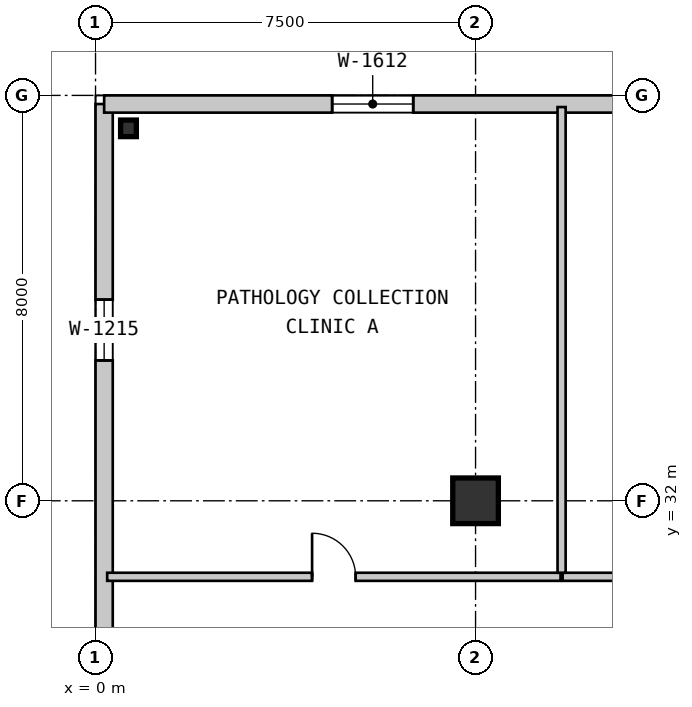
"""IFC4 building model, lengths in metres.
Left out: names, types, materials, properties, quantities, classifications, styles, units other than length and angle.
Written with IfcOpenShell. Run it as: python <this file> out.ifc"""

import sys

from ifc_helpers import new_model, si_unit, direction, frame, frame_2d, origin, origin_2d, place, context, subcontext, project, spatial, rectangle, circle, i_section, extrude, source, transform, mapped, element, fill, save


model = new_model("IFC4")
c1 = context("Model", 3, precision=1e-05, world=origin(), true_north=direction((0.0, 1.0)))
c2 = subcontext(c1, "Body", "Model", "MODEL_VIEW")
j1 = project(units=[si_unit("LENGTHUNIT", "METRE"), si_unit("PLANEANGLEUNIT", "RADIAN")], contexts=[c1])
p1 = place(None, origin())
s1 = spatial("IfcSite", under=j1, at=p1, CompositionType="ELEMENT")
p2 = place(p1, origin())
s2 = spatial("IfcBuilding", under=s1, at=p2, CompositionType="ELEMENT")
p3 = place(p2, frame((0.0, 0.0, 4.55)))
s3 = spatial("IfcBuildingStorey", under=s2, at=p3, CompositionType="ELEMENT", Elevation=4.55)
m1 = source(origin(), c2, "Body", "SweptSolid", [
    extrude(circle(Radius=0.45, at=origin_2d()), origin(), (0.0, 0.0, 1.0), 3.85),
])
p4 = place(p3, frame((7.5, 32.0, 0.0), z_axis=(0.0, 0.0, 1.0), x_axis=(1.0, 0.0, 0.0)))
e1 = element("IfcColumn", 1, at=p4, inside=s3, PredefinedType="COLUMN", context=c2, shape_type="MappedRepresentation", body=[
    mapped(m1, transform((0.0, 0.0, 0.0), scale=1.0)),
])
m2 = source(origin(), c2, "Body", "SweptSolid", [
    extrude(i_section(OverallWidth=0.311, OverallDepth=0.327, WebThickness=0.016, FlangeThickness=0.025, at=origin_2d()), origin(), (0.0, 0.0, 1.0), 3.85),
])
p5 = place(p3, frame((0.65, 39.35, 0.0), z_axis=(0.0, 0.0, 1.0), x_axis=(1.0, 0.0, 0.0)))
e2 = element("IfcColumn", 2, at=p5, inside=s3, PredefinedType="COLUMN", context=c2, shape_type="MappedRepresentation", body=[
    mapped(m2, transform((0.0, 0.0, 0.0), scale=1.0)),
])
m3 = source(origin(), c2, "Body", "SweptSolid", [
    extrude(rectangle(XDim=39.66, YDim=0.34, at=frame_2d((19.83, 0.0))), origin(), (0.0, 0.0, 1.0), 3.59),
])
p6 = place(p3, frame((0.17, 0.17, 0.0), z_axis=(0.0, 0.0, 1.0), x_axis=(0.0, 1.0, 0.0)))
e3 = element("IfcWall", 3, at=p6, inside=s3, PredefinedType="SOLIDWALL", context=c2, shape_type="MappedRepresentation", body=[
    mapped(m3, transform((0.0, 0.0, 0.0), scale=1.0)),
])
m4 = source(origin(), c2, "Body", "SweptSolid", [
    extrude(rectangle(XDim=2.4, YDim=1.8, at=frame_2d((1.2, 0.9))), frame((0.0, 0.18, 0.0), z_axis=(0.0, -1.0, 0.0), x_axis=(1.0, 0.0, 0.0)), (0.0, 0.0, 1.0), 0.36),
])
p7 = place(p6, frame((3.2, 0.0, 0.95)))
e4 = element("IfcOpeningElement", 4, at=p7, cuts=e3, PredefinedType="OPENING", context=c2, shape_type="MappedRepresentation", body=[
    mapped(m4, transform((0.0, 0.0, 0.0), scale=1.0)),
])
m5 = source(origin(), c2, "Body", "SweptSolid", [
    extrude(rectangle(XDim=1.8, YDim=1.6, at=frame_2d((0.9, 0.8))), frame((0.0, 0.18, 0.0), z_axis=(0.0, -1.0, 0.0), x_axis=(1.0, 0.0, 0.0)), (0.0, 0.0, 1.0), 0.36),
])
p8 = place(p6, frame((6.4, 0.0, 0.95)))
e5 = element("IfcOpeningElement", 5, at=p8, cuts=e3, PredefinedType="OPENING", context=c2, shape_type="MappedRepresentation", body=[
    mapped(m5, transform((0.0, 0.0, 0.0), scale=1.0)),
])
m6 = source(origin(), c2, "Body", "SweptSolid", [
    extrude(rectangle(XDim=1.5, YDim=1.5, at=frame_2d((0.75, 0.75))), frame((0.0, 0.18, 0.0), z_axis=(0.0, -1.0, 0.0), x_axis=(1.0, 0.0, 0.0)), (0.0, 0.0, 1.0), 0.36),
])
p9 = place(p6, frame((22.6, 0.0, 0.95)))
e6 = element("IfcOpeningElement", 6, at=p9, cuts=e3, PredefinedType="OPENING", context=c2, shape_type="MappedRepresentation", body=[
    mapped(m6, transform((0.0, 0.0, 0.0), scale=1.0)),
])
m7 = source(origin(), c2, "Body", "SweptSolid", [
    extrude(rectangle(XDim=1.2, YDim=1.5, at=frame_2d((0.6, 0.75))), frame((0.0, 0.18, 0.0), z_axis=(0.0, -1.0, 0.0), x_axis=(1.0, 0.0, 0.0)), (0.0, 0.0, 1.0), 0.36),
])
p10 = place(p6, frame((34.6, 0.0, 0.95)))
e7 = element("IfcOpeningElement", 7, at=p10, cuts=e3, PredefinedType="OPENING", context=c2, shape_type="MappedRepresentation", body=[
    mapped(m7, transform((0.0, 0.0, 0.0), scale=1.0)),
])
m8 = source(origin(), c2, "Body", "SweptSolid", [
    extrude(rectangle(XDim=69.66, YDim=0.34, at=frame_2d((34.83, 0.0))), origin(), (0.0, 0.0, 1.0), 3.59),
])
p11 = place(p3, frame((0.17, 39.83, 0.0), z_axis=(0.0, 0.0, 1.0), x_axis=(1.0, 0.0, 0.0)))
e8 = element("IfcWall", 8, at=p11, inside=s3, PredefinedType="SOLIDWALL", context=c2, shape_type="MappedRepresentation", body=[
    mapped(m8, transform((0.0, 0.0, 0.0), scale=1.0)),
])
m9 = source(origin(), c2, "Body", "SweptSolid", [
    extrude(rectangle(XDim=1.6, YDim=1.2, at=frame_2d((0.8, 0.6))), frame((0.0, 0.18, 0.0), z_axis=(0.0, -1.0, 0.0), x_axis=(1.0, 0.0, 0.0)), (0.0, 0.0, 1.0), 0.36),
])
p12 = place(p11, frame((4.5, 0.0, 0.95)))
e9 = element("IfcOpeningElement", 9, at=p12, cuts=e8, PredefinedType="OPENING", context=c2, shape_type="MappedRepresentation", body=[
    mapped(m9, transform((0.0, 0.0, 0.0), scale=1.0)),
])
p13 = place(p11, frame((22.5, 0.0, 0.95)))
e10 = element("IfcOpeningElement", 10, at=p13, cuts=e8, PredefinedType="OPENING", context=c2, shape_type="MappedRepresentation", body=[
    mapped(m9, transform((0.0, 0.0, 0.0), scale=1.0)),
])
p14 = place(p11, frame((29.0, 0.0, 0.95)))
e11 = element("IfcOpeningElement", 11, at=p14, cuts=e8, PredefinedType="OPENING", context=c2, shape_type="MappedRepresentation", body=[
    mapped(m9, transform((0.0, 0.0, 0.0), scale=1.0)),
])
p15 = place(p11, frame((40.5, 0.0, 0.95)))
e12 = element("IfcOpeningElement", 12, at=p15, cuts=e8, PredefinedType="OPENING", context=c2, shape_type="MappedRepresentation", body=[
    mapped(m9, transform((0.0, 0.0, 0.0), scale=1.0)),
])
p16 = place(p11, frame((46.5, 0.0, 0.95)))
e13 = element("IfcOpeningElement", 13, at=p16, cuts=e8, PredefinedType="OPENING", context=c2, shape_type="MappedRepresentation", body=[
    mapped(m9, transform((0.0, 0.0, 0.0), scale=1.0)),
])
p17 = place(p11, frame((62.5, 0.0, 0.95)))
e14 = element("IfcOpeningElement", 14, at=p17, cuts=e8, PredefinedType="OPENING", context=c2, shape_type="MappedRepresentation", body=[
    mapped(m9, transform((0.0, 0.0, 0.0), scale=1.0)),
])
m10 = source(origin(), c2, "Body", "SweptSolid", [
    extrude(rectangle(XDim=8.948, YDim=0.16, at=frame_2d((4.474, 0.0))), origin(), (0.0, 0.0, 1.0), 3.59),
])
p18 = place(p3, frame((0.23, 30.5, 0.0), z_axis=(0.0, 0.0, 1.0), x_axis=(1.0, 0.0, 0.0)))
e15 = element("IfcWall", 15, at=p18, inside=s3, PredefinedType="PARTITIONING", context=c2, shape_type="MappedRepresentation", body=[
    mapped(m10, transform((0.0, 0.0, 0.0), scale=1.0)),
])
m11 = source(origin(), c2, "Body", "SweptSolid", [
    extrude(rectangle(XDim=0.86, YDim=2.1, at=frame_2d((0.43, 1.05))), frame((0.0, 0.09, 0.0), z_axis=(0.0, -1.0, 0.0), x_axis=(1.0, 0.0, 0.0)), (0.0, 0.0, 1.0), 0.18),
])
p19 = place(p18, frame((4.044, 0.0, 0.0)))
e16 = element("IfcOpeningElement", 16, at=p19, cuts=e15, PredefinedType="OPENING", context=c2, shape_type="MappedRepresentation", body=[
    mapped(m11, transform((0.0, 0.0, 0.0), scale=1.0)),
])
m12 = source(origin(), c2, "Body", "SweptSolid", [
    extrude(rectangle(XDim=3.042, YDim=0.16, at=frame_2d((1.521, 0.0))), origin(), (0.0, 0.0, 1.0), 3.59),
])
p20 = place(p3, frame((9.218, 30.5, 0.0), z_axis=(0.0, 0.0, 1.0), x_axis=(1.0, 0.0, 0.0)))
e17 = element("IfcWall", 17, at=p20, inside=s3, PredefinedType="PARTITIONING", context=c2, shape_type="MappedRepresentation", body=[
    mapped(m12, transform((0.0, 0.0, 0.0), scale=1.0)),
])
m13 = source(origin(), c2, "Body", "SweptSolid", [
    extrude(rectangle(XDim=9.19, YDim=0.16, at=frame_2d((4.595, 0.0))), origin(), (0.0, 0.0, 1.0), 3.59),
])
p21 = place(p3, frame((9.198, 39.77, 0.0), z_axis=(0.0, 0.0, 1.0), x_axis=(0.0, -1.0, 0.0)))
e18 = element("IfcWall", 18, at=p21, inside=s3, PredefinedType="PARTITIONING", context=c2, shape_type="MappedRepresentation", body=[
    mapped(m13, transform((0.0, 0.0, 0.0), scale=1.0)),
])
m14 = source(origin(), c2, "Body", "SweptSolid", [
    extrude(rectangle(XDim=1.2, YDim=1.5, at=frame_2d((0.6, 0.75))), frame((0.0, 0.03, 0.0), z_axis=(0.0, -1.0, 0.0), x_axis=(1.0, 0.0, 0.0)), (0.0, 0.0, 1.0), 0.06),
])
p22 = place(p10, origin())
e19 = element("IfcWindow", 19, at=p22, inside=s3, PartitioningType="SINGLE_PANEL", PredefinedType="WINDOW", context=c2, shape_type="MappedRepresentation", body=[
    mapped(m14, transform((0.0, 0.0, 0.0), scale=1.0)),
])
fill(e7, e19)
m15 = source(origin(), c2, "Body", "SweptSolid", [
    extrude(rectangle(XDim=1.6, YDim=1.2, at=frame_2d((0.8, 0.6))), frame((0.0, 0.03, 0.0), z_axis=(0.0, -1.0, 0.0), x_axis=(1.0, 0.0, 0.0)), (0.0, 0.0, 1.0), 0.06),
])
p23 = place(p12, origin())
e20 = element("IfcWindow", 20, at=p23, inside=s3, PartitioningType="SINGLE_PANEL", PredefinedType="WINDOW", context=c2, shape_type="MappedRepresentation", body=[
    mapped(m15, transform((0.0, 0.0, 0.0), scale=1.0)),
])
fill(e9, e20)
m16 = source(origin(), c2, "Body", "SweptSolid", [
    extrude(rectangle(XDim=0.86, YDim=2.1, at=frame_2d((0.43, 1.05))), frame((0.0, 0.025, 0.0), z_axis=(0.0, -1.0, 0.0), x_axis=(1.0, 0.0, 0.0)), (0.0, 0.0, 1.0), 0.05),
])
p24 = place(p19, origin())
e21 = element("IfcDoor", 21, at=p24, inside=s3, OperationType="SINGLE_SWING_LEFT", PredefinedType="DOOR", context=c2, shape_type="MappedRepresentation", body=[
    mapped(m16, transform((0.0, 0.0, 0.0), scale=1.0)),
])
fill(e16, e21)
save(model, sys.argv[1])
